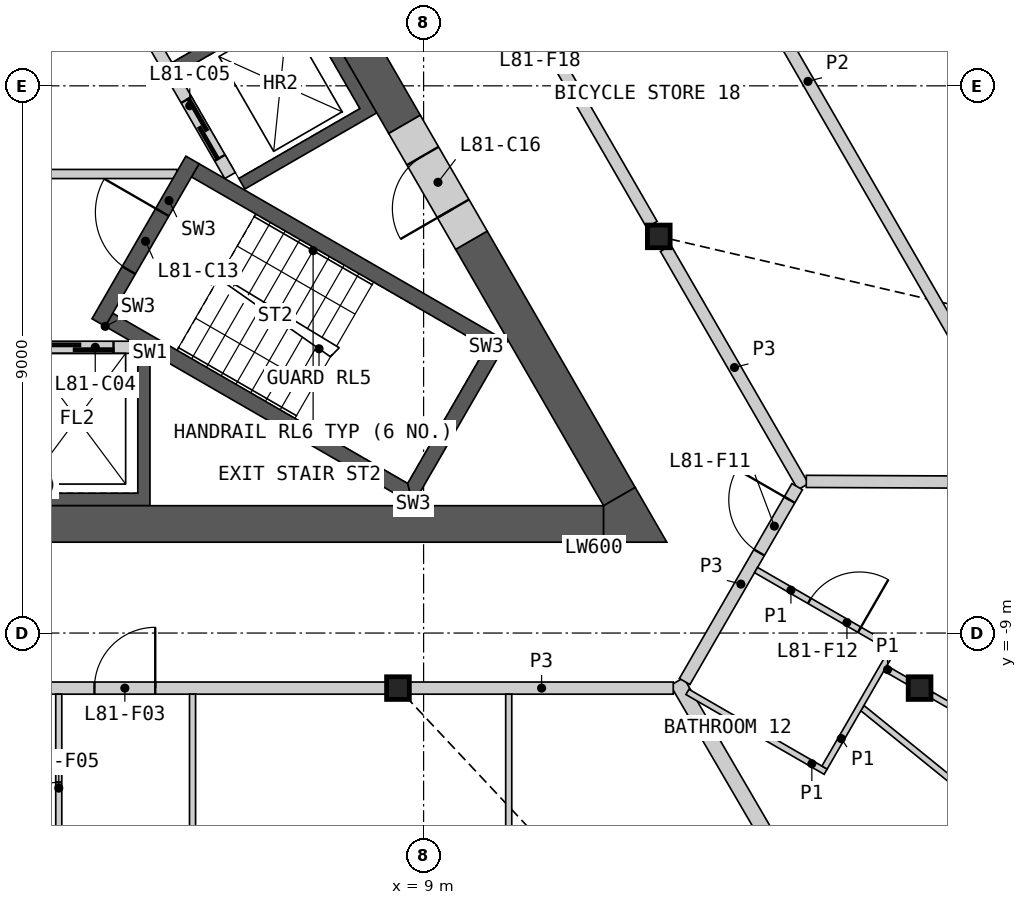
"""IFC4 building model, lengths in metres.
Left out: names, types, materials, properties, quantities, classifications, styles, units other than length and angle.
Written with IfcOpenShell. Run it as: python <this file> out.ifc"""

import sys

from ifc_helpers import new_model, si_unit, direction, frame, frame_2d, origin, origin_2d, place, context, subcontext, project, spatial, polyline, rectangle, i_section, outline, extrude, element, fill, save


model = new_model("IFC4")
c1 = context("Model", 3, precision=1e-05, world=origin(), true_north=direction((0.0, 1.0)))
c2 = subcontext(c1, "Body", "Model", "MODEL_VIEW")
j1 = project(units=[si_unit("LENGTHUNIT", "METRE"), si_unit("PLANEANGLEUNIT", "RADIAN")], contexts=[c1])
p1 = place(None, origin())
s1 = spatial("IfcSite", under=j1, at=p1, CompositionType="ELEMENT")
p2 = place(p1, origin())
s2 = spatial("IfcBuilding", under=s1, at=p2, CompositionType="ELEMENT")
p3 = place(p2, frame((0.0, 0.0, 364.4)))
s3 = spatial("IfcBuildingStorey", under=s2, at=p3, CompositionType="ELEMENT", Elevation=364.4)
for number, where, z_axis, x_axis in (
    (1, (8.578, -9.906, 0.0), (0.0, 0.0, 1.0), (1.0, 0.0, 0.0)),
    (2, (17.157, -9.906, 0.0), (0.0, 0.0, 1.0), (1.0, 0.0, 0.0)),
    (3, (12.868, -2.476, 0.0), (0.0, 0.0, 1.0), (1.0, 0.0, 0.0)),
):
    element("IfcColumn", number, at=place(p3, frame(where, z_axis=z_axis, x_axis=x_axis)), inside=s3, PredefinedType="COLUMN", context=c2, shape_type="SweptSolid", body=[
        extrude(i_section(OverallWidth=0.374, OverallDepth=0.372, WebThickness=0.016, FlangeThickness=0.026, at=origin_2d()), origin(), (0.0, 0.0, 1.0), 3.4),
    ])
p4 = place(p3, origin())
e4 = element("IfcWall", 4, at=p4, inside=s3, PredefinedType="SHEAR", context=c2, shape_type="SweptSolid", body=[
    extrude(outline(polyline([(4.5, -4.4), (4.5, -6.906), (-4.5, -6.906), (-4.5, -4.4), (-4.3, -4.4), (-4.3, -6.7), (-2.3, -6.7), (-2.3, -4.4), (-2.1, -4.4), (-2.1, -6.7), (-0.1, -6.7), (-0.1, -4.4), (0.1, -4.4), (0.1, -6.7), (2.1, -6.7), (2.1, -4.4), (2.3, -4.4), (2.3, -6.7), (4.3, -6.7), (4.3, -4.4), (4.5, -4.4)])), origin(), (0.0, 0.0, 1.0), 3.1),
])
p5 = place(p3, frame((-4.187, -4.3, 0.0), z_axis=(0.0, 0.0, 1.0), x_axis=(1.0, 0.0, 0.0)))
e5 = element("IfcWall", 5, at=p5, inside=s3, PredefinedType="SOLIDWALL", context=c2, shape_type="SweptSolid", body=[
    extrude(rectangle(XDim=8.373, YDim=0.2, at=frame_2d((4.187, 0.0))), origin(), (0.0, 0.0, 1.0), 3.1),
])
p6 = place(p5, frame((0.287, 0.0, 0.0)))
e6 = element("IfcOpeningElement", 6, at=p6, cuts=e5, PredefinedType="OPENING", context=c2, shape_type="SweptSolid", body=[
    extrude(rectangle(XDim=1.2, YDim=2.1, at=frame_2d((0.6, 1.05))), frame((0.0, 0.11, 0.0), z_axis=(0.0, -1.0, 0.0), x_axis=(1.0, 0.0, 0.0)), (0.0, 0.0, 1.0), 0.22),
])
p7 = place(p5, frame((2.387, 0.0, 0.0)))
e7 = element("IfcOpeningElement", 7, at=p7, cuts=e5, PredefinedType="OPENING", context=c2, shape_type="SweptSolid", body=[
    extrude(rectangle(XDim=1.4, YDim=2.1, at=frame_2d((0.7, 1.05))), frame((0.0, 0.11, 0.0), z_axis=(0.0, -1.0, 0.0), x_axis=(1.0, 0.0, 0.0)), (0.0, 0.0, 1.0), 0.22),
])
p8 = place(p5, frame((4.737, 0.0, 0.0)))
e8 = element("IfcOpeningElement", 8, at=p8, cuts=e5, PredefinedType="OPENING", context=c2, shape_type="SweptSolid", body=[
    extrude(rectangle(XDim=1.1, YDim=2.1, at=frame_2d((0.55, 1.05))), frame((0.0, 0.11, 0.0), z_axis=(0.0, -1.0, 0.0), x_axis=(1.0, 0.0, 0.0)), (0.0, 0.0, 1.0), 0.22),
])
p9 = place(p5, frame((6.887, 0.0, 0.0)))
e9 = element("IfcOpeningElement", 9, at=p9, cuts=e5, PredefinedType="OPENING", context=c2, shape_type="SweptSolid", body=[
    extrude(rectangle(XDim=1.2, YDim=2.1, at=frame_2d((0.6, 1.05))), frame((0.0, 0.11, 0.0), z_axis=(0.0, -1.0, 0.0), x_axis=(1.0, 0.0, 0.0)), (0.0, 0.0, 1.0), 0.22),
])
p10 = place(p3, origin())
e10 = element("IfcWall", 10, at=p10, inside=s3, PredefinedType="SHEAR", context=c2, shape_type="SweptSolid", body=[
    extrude(outline(polyline([(1.561, 6.097), (3.731, 7.35), (8.231, -0.444), (6.061, -1.697), (5.96, -1.524), (7.952, -0.374), (6.952, 1.358), (4.96, 0.208), (4.861, 0.381), (6.852, 1.531), (5.852, 3.263), (3.861, 2.113), (3.76, 2.287), (5.752, 3.437), (4.752, 5.169), (2.76, 4.019), (2.66, 4.192), (4.652, 5.342), (3.652, 7.074), (1.66, 5.924), (1.561, 6.097)])), origin(), (0.0, 0.0, 1.0), 3.1),
])
p11 = place(p3, frame((5.817, -1.476, 0.0), z_axis=(0.0, 0.0, 1.0), x_axis=(-0.500002616675, 0.866023893041, 0.0)))
e11 = element("IfcWall", 11, at=p11, inside=s3, PredefinedType="SOLIDWALL", context=c2, shape_type="SweptSolid", body=[
    extrude(rectangle(XDim=8.373, YDim=0.2, at=frame_2d((4.187, 0.0))), origin(), (0.0, 0.0, 1.0), 3.1),
])
p12 = place(p11, frame((0.337, 0.0, 0.0)))
e12 = element("IfcOpeningElement", 12, at=p12, cuts=e11, PredefinedType="OPENING", context=c2, shape_type="SweptSolid", body=[
    extrude(rectangle(XDim=1.1, YDim=2.1, at=frame_2d((0.55, 1.05))), frame((0.0, 0.11, 0.0), z_axis=(0.0, -1.0, 0.0), x_axis=(1.0, 0.0, 0.0)), (0.0, 0.0, 1.0), 0.22),
])
p13 = place(p11, frame((2.537, 0.0, 0.0)))
e13 = element("IfcOpeningElement", 13, at=p13, cuts=e11, PredefinedType="OPENING", context=c2, shape_type="SweptSolid", body=[
    extrude(rectangle(XDim=1.1, YDim=2.1, at=frame_2d((0.55, 1.05))), frame((0.0, 0.11, 0.0), z_axis=(0.0, -1.0, 0.0), x_axis=(1.0, 0.0, 0.0)), (0.0, 0.0, 1.0), 0.22),
])
p14 = place(p11, frame((4.737, 0.0, 0.0)))
e14 = element("IfcOpeningElement", 14, at=p14, cuts=e11, PredefinedType="OPENING", context=c2, shape_type="SweptSolid", body=[
    extrude(rectangle(XDim=1.1, YDim=2.1, at=frame_2d((0.55, 1.05))), frame((0.0, 0.11, 0.0), z_axis=(0.0, -1.0, 0.0), x_axis=(1.0, 0.0, 0.0)), (0.0, 0.0, 1.0), 0.22),
])
p15 = place(p11, frame((7.037, 0.0, 0.0)))
e15 = element("IfcOpeningElement", 15, at=p15, cuts=e11, PredefinedType="OPENING", context=c2, shape_type="SweptSolid", body=[
    extrude(rectangle(XDim=0.9, YDim=2.1, at=frame_2d((0.45, 1.05))), frame((0.0, 0.11, 0.0), z_axis=(0.0, -1.0, 0.0), x_axis=(1.0, 0.0, 0.0)), (0.0, 0.0, 1.0), 0.22),
])
p16 = place(p3, frame((-4.941, -1.45, 0.0), z_axis=(0.0, 0.0, 1.0), x_axis=(1.0, 0.0, 0.0)))
e16 = element("IfcWall", 16, at=p16, inside=s3, PredefinedType="PARTITIONING", context=c2, shape_type="SweptSolid", body=[
    extrude(rectangle(XDim=9.882, YDim=0.15, at=frame_2d((4.941, 0.0))), origin(), (0.0, 0.0, 1.0), 3.1),
])
p17 = place(p16, frame((4.391, 0.0, 0.0)))
e17 = element("IfcOpeningElement", 17, at=p17, cuts=e16, PredefinedType="OPENING", context=c2, shape_type="SweptSolid", body=[
    extrude(rectangle(XDim=1.1, YDim=2.1, at=frame_2d((0.55, 1.05))), frame((0.0, 0.085, 0.0), z_axis=(0.0, -1.0, 0.0), x_axis=(1.0, 0.0, 0.0)), (0.0, 0.0, 1.0), 0.17),
])
p18 = place(p3, origin())
e18 = element("IfcWall", 18, at=p18, inside=s3, PredefinedType="SHEAR", context=c2, shape_type="SweptSolid", body=[
    extrude(outline(polyline([(3.763, -3.956), (8.83, -6.881), (8.738, -6.539), (3.888, -3.739), (3.763, -3.956)])), origin(), (0.0, 0.0, 1.0), 3.1),
])
p19 = place(p3, origin())
e19 = element("IfcWall", 19, at=p19, inside=s3, PredefinedType="SHEAR", context=c2, shape_type="SweptSolid", body=[
    extrude(outline(polyline([(8.83, -6.881), (10.374, -4.206), (10.032, -4.298), (8.738, -6.539), (8.83, -6.881)])), origin(), (0.0, 0.0, 1.0), 3.1),
])
p20 = place(p3, origin())
e20 = element("IfcWall", 20, at=p20, inside=s3, PredefinedType="SHEAR", context=c2, shape_type="SweptSolid", body=[
    extrude(outline(polyline([(10.032, -4.298), (10.374, -4.206), (5.307, -1.281), (5.182, -1.498), (10.032, -4.298)])), origin(), (0.0, 0.0, 1.0), 3.1),
])
p21 = place(p3, frame((3.655, -3.893, 0.0), z_axis=(0.0, 0.0, 1.0), x_axis=(0.499982516597, 0.866035497597, 0.0)))
e21 = element("IfcWall", 21, at=p21, inside=s3, PredefinedType="SHEAR", context=c2, shape_type="SweptSolid", body=[
    extrude(rectangle(XDim=3.088, YDim=0.25, at=frame_2d((1.544, 0.0))), origin(), (0.0, 0.0, 1.0), 3.1),
])
p22 = place(p21, frame((0.994, 0.0, 0.0)))
e22 = element("IfcOpeningElement", 22, at=p22, cuts=e21, PredefinedType="OPENING", context=c2, shape_type="SweptSolid", body=[
    extrude(rectangle(XDim=1.1, YDim=2.1, at=frame_2d((0.55, 1.05))), frame((0.0, 0.135, 0.0), z_axis=(0.0, -1.0, 0.0), x_axis=(1.0, 0.0, 0.0)), (0.0, 0.0, 1.0), 0.27),
])
p23 = place(p3, frame((-11.961, -7.206, 0.0), z_axis=(0.0, 0.0, 1.0), x_axis=(1.0, 0.0, 0.0)))
e23 = element("IfcWall", 23, at=p23, inside=s3, PredefinedType="SHEAR", context=c2, shape_type="SweptSolid", body=[
    extrude(rectangle(XDim=23.921, YDim=0.6, at=frame_2d((11.961, 0.0))), origin(), (0.0, 0.0, 1.0), 3.1),
])
p24 = place(p3, frame((8.686, -0.634, 0.0), z_axis=(0.0, 0.0, 1.0), x_axis=(-0.50001836461, 0.866014800712, 0.0)))
e24 = element("IfcWall", 24, at=p24, inside=s3, PredefinedType="SHEAR", context=c2, shape_type="SweptSolid", body=[
    extrude(rectangle(XDim=10.451, YDim=0.6, at=frame_2d((5.225, 0.0))), origin(), (0.0, 0.0, 1.0), 3.1),
])
p25 = place(p3, frame((12.221, -6.756, 0.0), z_axis=(0.0, 0.0, 1.0), x_axis=(-0.50000604952, 0.866021911064, 0.0)))
e25 = element("IfcWall", 25, at=p25, inside=s3, PredefinedType="SHEAR", context=c2, shape_type="SweptSolid", body=[
    extrude(rectangle(XDim=4.869, YDim=0.6, at=frame_2d((2.434, 0.0))), origin(), (0.0, 0.0, 1.0), 3.1),
])
p26 = place(p3, origin())
e26 = element("IfcWall", 26, at=p26, inside=s3, PredefinedType="SHEAR", context=c2, shape_type="SweptSolid", body=[
    extrude(outline(polyline([(11.961, -7.506), (11.961, -6.906), (12.48, -6.606), (13.0, -7.506), (11.961, -7.506)])), origin(), (0.0, 0.0, 1.0), 3.1),
])
p27 = place(p3, frame((9.786, -2.539, 0.0), z_axis=(0.0, 0.0, 1.0), x_axis=(-0.499981787252, 0.866035918664, 0.0)))
e27 = element("IfcWall", 27, at=p27, inside=s3, PredefinedType="SHEAR", context=c2, shape_type="SweptSolid", body=[
    extrude(rectangle(XDim=2.2, YDim=0.6, at=frame_2d((1.1, 0.0))), origin(), (0.0, 0.0, 1.0), 3.1),
])
p28 = place(p27, frame((0.6, 0.0, 0.0)))
e28 = element("IfcOpeningElement", 28, at=p28, cuts=e27, PredefinedType="OPENING", context=c2, shape_type="SweptSolid", body=[
    extrude(rectangle(XDim=1.0, YDim=2.1, at=frame_2d((0.5, 1.05))), frame((0.0, 0.31, 0.0), z_axis=(0.0, -1.0, 0.0), x_axis=(1.0, 0.0, 0.0)), (0.0, 0.0, 1.0), 0.62),
])
p29 = place(p3, frame((13.168, -9.798, 0.0), z_axis=(0.0, 0.0, 1.0), x_axis=(0.503632750219, -0.863917850786, 0.0)))
e29 = element("IfcWall", 29, at=p29, inside=s3, PredefinedType="PARTITIONING", context=c2, shape_type="SweptSolid", body=[
    extrude(rectangle(XDim=14.972, YDim=0.25, at=frame_2d((7.486, 0.0))), origin(), (0.0, 0.0, 1.0), 2.33),
])
p30 = place(p3, frame((0.197, -9.906, 0.0), z_axis=(0.0, 0.0, 1.0), x_axis=(1.0, 0.0, 0.0)))
e30 = element("IfcWall", 30, at=p30, inside=s3, PredefinedType="PARTITIONING", context=c2, shape_type="SweptSolid", body=[
    extrude(rectangle(XDim=8.185, YDim=0.2, at=frame_2d((4.092, 0.0))), origin(), (0.0, 0.0, 1.0), 3.1),
])
p31 = place(p30, frame((3.39, 0.0, 0.0)))
e31 = element("IfcOpeningElement", 31, at=p31, cuts=e30, PredefinedType="OPENING", context=c2, shape_type="SweptSolid", body=[
    extrude(rectangle(XDim=1.0, YDim=2.1, at=frame_2d((0.5, 1.05))), frame((0.0, 0.11, 0.0), z_axis=(0.0, -1.0, 0.0), x_axis=(1.0, 0.0, 0.0)), (0.0, 0.0, 1.0), 0.22),
])
p32 = place(p3, frame((8.692, 4.756, 0.0), z_axis=(0.0, 0.0, 1.0), x_axis=(0.500001682468, -0.866024432409, 0.0)))
e32 = element("IfcWall", 32, at=p32, inside=s3, PredefinedType="PARTITIONING", context=c2, shape_type="SweptSolid", body=[
    extrude(rectangle(XDim=8.124, YDim=0.2, at=frame_2d((4.062, 0.0))), origin(), (0.0, 0.0, 1.0), 3.1),
])
p33 = place(p32, frame((3.587, 0.0, 0.0)))
e33 = element("IfcOpeningElement", 33, at=p33, cuts=e32, PredefinedType="OPENING", context=c2, shape_type="SweptSolid", body=[
    extrude(rectangle(XDim=0.95, YDim=2.1, at=frame_2d((0.475, 1.05))), frame((0.0, 0.11, 0.0), z_axis=(0.0, -1.0, 0.0), x_axis=(1.0, 0.0, 0.0)), (0.0, 0.0, 1.0), 0.22),
])
p34 = place(p3, frame((8.775, -9.906, 0.0), z_axis=(0.0, 0.0, 1.0), x_axis=(1.0, 0.0, 0.0)))
e34 = element("IfcWall", 34, at=p34, inside=s3, PredefinedType="PARTITIONING", context=c2, shape_type="SweptSolid", body=[
    extrude(rectangle(XDim=4.331, YDim=0.2, at=frame_2d((2.165, 0.0))), origin(), (0.0, 0.0, 1.0), 3.1),
])
p35 = place(p3, frame((12.981, -2.673, 0.0), z_axis=(0.0, 0.0, 1.0), x_axis=(0.499974648164, -0.866040040179, 0.0)))
e35 = element("IfcWall", 35, at=p35, inside=s3, PredefinedType="PARTITIONING", context=c2, shape_type="SweptSolid", body=[
    extrude(rectangle(XDim=4.525, YDim=0.2, at=frame_2d((2.263, 0.0))), origin(), (0.0, 0.0, 1.0), 3.1),
])
p36 = place(p3, frame((13.293, -9.797, 0.0), z_axis=(0.0, 0.0, 1.0), x_axis=(0.499977520935, 0.86603838169, 0.0)))
e36 = element("IfcWall", 36, at=p36, inside=s3, PredefinedType="PARTITIONING", context=c2, shape_type="SweptSolid", body=[
    extrude(rectangle(XDim=3.701, YDim=0.2, at=frame_2d((1.851, 0.0))), origin(), (0.0, 0.0, 1.0), 3.1),
])
p37 = place(p36, frame((2.451, 0.0, 0.0)))
e37 = element("IfcOpeningElement", 37, at=p37, cuts=e36, PredefinedType="OPENING", context=c2, shape_type="SweptSolid", body=[
    extrude(rectangle(XDim=1.0, YDim=2.1, at=frame_2d((0.5, 1.05))), frame((0.0, 0.11, 0.0), z_axis=(0.0, -1.0, 0.0), x_axis=(1.0, 0.0, 0.0)), (0.0, 0.0, 1.0), 0.22),
])
p38 = place(p3, frame((11.573, 6.566, 0.0), z_axis=(0.0, 0.0, 1.0), x_axis=(0.499993542657, -0.866029131901, 0.0)))
e38 = element("IfcWall", 38, at=p38, inside=s3, PredefinedType="PARTITIONING", context=c2, shape_type="SweptSolid", body=[
    extrude(rectangle(XDim=14.994, YDim=0.2, at=frame_2d((7.497, 0.0))), origin(), (0.0, 0.0, 1.0), 2.33),
])
p39 = place(p38, frame((5.166, 0.0, 0.0)))
e39 = element("IfcOpeningElement", 39, at=p39, cuts=e38, PredefinedType="OPENING", context=c2, shape_type="SweptSolid", body=[
    extrude(rectangle(XDim=0.95, YDim=2.1, at=frame_2d((0.475, 1.05))), frame((0.0, 0.11, 0.0), z_axis=(0.0, -1.0, 0.0), x_axis=(1.0, 0.0, 0.0)), (0.0, 0.0, 1.0), 0.22),
])
p40 = place(p3, frame((15.294, -6.506, 0.0), z_axis=(0.0, 0.0, 1.0), x_axis=(0.99999116141, -0.004204414611, 0.0)))
e40 = element("IfcWall", 40, at=p40, inside=s3, PredefinedType="PARTITIONING", context=c2, shape_type="SweptSolid", body=[
    extrude(rectangle(XDim=14.807, YDim=0.2, at=frame_2d((7.404, 0.0))), origin(), (0.0, 0.0, 1.0), 2.33),
])
p41 = place(p3, frame((16.216, -10.234, 0.0), z_axis=(0.0, 0.0, 1.0), x_axis=(0.777145059662, -0.629321504672, 0.0)))
e41 = element("IfcWall", 41, at=p41, inside=s3, PredefinedType="PARTITIONING", context=c2, shape_type="SweptSolid", body=[
    extrude(rectangle(XDim=12.59, YDim=0.1, at=frame_2d((6.295, 0.0))), origin(), (0.0, 0.0, 1.0), 2.33),
])
p42 = place(p41, frame((7.074, 0.0, 0.0)))
e42 = element("IfcOpeningElement", 42, at=p42, cuts=e41, PredefinedType="OPENING", context=c2, shape_type="SweptSolid", body=[
    extrude(rectangle(XDim=0.95, YDim=2.1, at=frame_2d((0.475, 1.05))), frame((0.0, 0.06, 0.0), z_axis=(0.0, -1.0, 0.0), x_axis=(1.0, 0.0, 0.0)), (0.0, 0.0, 1.0), 0.12),
])
p43 = place(p3, frame((10.4, -21.828, 0.0), z_axis=(0.0, 0.0, 1.0), x_axis=(0.0, 1.0, 0.0)))
e43 = element("IfcWall", 43, at=p43, inside=s3, PredefinedType="PARTITIONING", context=c2, shape_type="SweptSolid", body=[
    extrude(rectangle(XDim=11.822, YDim=0.1, at=frame_2d((5.911, 0.0))), origin(), (0.0, 0.0, 1.0), 2.33),
])
p44 = place(p43, frame((1.156, 0.0, 0.0)))
e44 = element("IfcOpeningElement", 44, at=p44, cuts=e43, PredefinedType="OPENING", context=c2, shape_type="SweptSolid", body=[
    extrude(rectangle(XDim=0.95, YDim=2.1, at=frame_2d((0.475, 1.05))), frame((0.0, 0.06, 0.0), z_axis=(0.0, -1.0, 0.0), x_axis=(1.0, 0.0, 0.0)), (0.0, 0.0, 1.0), 0.12),
])
p45 = place(p3, frame((17.354, -10.019, 0.0), z_axis=(0.0, 0.0, 1.0), x_axis=(0.866019680922, -0.500009912158, 0.0)))
e45 = element("IfcWall", 45, at=p45, inside=s3, PredefinedType="PARTITIONING", context=c2, shape_type="SweptSolid", body=[
    extrude(rectangle(XDim=10.881, YDim=0.1, at=frame_2d((5.44, 0.0))), origin(), (0.0, 0.0, 1.0), 2.33),
])
p46 = place(p45, frame((1.655, 0.0, 0.0)))
e46 = element("IfcOpeningElement", 46, at=p46, cuts=e45, PredefinedType="OPENING", context=c2, shape_type="SweptSolid", body=[
    extrude(rectangle(XDim=0.95, YDim=2.1, at=frame_2d((0.475, 1.05))), frame((0.0, 0.06, 0.0), z_axis=(0.0, -1.0, 0.0), x_axis=(1.0, 0.0, 0.0)), (0.0, 0.0, 1.0), 0.12),
])
p47 = place(p3, frame((5.2, -17.146, 0.0), z_axis=(0.0, 0.0, 1.0), x_axis=(0.0, 1.0, 0.0)))
e47 = element("IfcWall", 47, at=p47, inside=s3, PredefinedType="PARTITIONING", context=c2, shape_type="SweptSolid", body=[
    extrude(rectangle(XDim=7.14, YDim=0.1, at=frame_2d((3.57, 0.0))), origin(), (0.0, 0.0, 1.0), 2.33),
])
p48 = place(p47, frame((1.266, 0.0, 0.0)))
e48 = element("IfcOpeningElement", 48, at=p48, cuts=e47, PredefinedType="OPENING", context=c2, shape_type="SweptSolid", body=[
    extrude(rectangle(XDim=0.95, YDim=2.1, at=frame_2d((0.475, 1.05))), frame((0.0, 0.06, 0.0), z_axis=(0.0, -1.0, 0.0), x_axis=(1.0, 0.0, 0.0)), (0.0, 0.0, 1.0), 0.12),
])
p49 = place(p3, frame((3.0, -15.956, 0.0), z_axis=(0.0, 0.0, 1.0), x_axis=(0.0, 1.0, 0.0)))
e49 = element("IfcWall", 49, at=p49, inside=s3, PredefinedType="PARTITIONING", context=c2, shape_type="SweptSolid", body=[
    extrude(rectangle(XDim=5.95, YDim=0.1, at=frame_2d((2.975, 0.0))), origin(), (0.0, 0.0, 1.0), 2.33),
])
p50 = place(p49, frame((3.55, 0.0, 0.0)))
e50 = element("IfcOpeningElement", 50, at=p50, cuts=e49, PredefinedType="OPENING", context=c2, shape_type="SweptSolid", body=[
    extrude(rectangle(XDim=0.95, YDim=2.1, at=frame_2d((0.475, 1.05))), frame((0.0, 0.06, 0.0), z_axis=(0.0, -1.0, 0.0), x_axis=(1.0, 0.0, 0.0)), (0.0, 0.0, 1.0), 0.12),
])
p51 = place(p3, frame((14.467, -7.964, 0.0), z_axis=(0.0, 0.0, 1.0), x_axis=(0.86601223543, -0.500022807565, 0.0)))
e51 = element("IfcWall", 51, at=p51, inside=s3, PredefinedType="PARTITIONING", context=c2, shape_type="SweptSolid", body=[
    extrude(rectangle(XDim=2.65, YDim=0.1, at=frame_2d((1.325, 0.0))), origin(), (0.0, 0.0, 1.0), 2.33),
])
p52 = place(p51, frame((1.014, 0.0, 0.0)))
e52 = element("IfcOpeningElement", 52, at=p52, cuts=e51, PredefinedType="OPENING", context=c2, shape_type="SweptSolid", body=[
    extrude(rectangle(XDim=0.95, YDim=2.1, at=frame_2d((0.475, 1.05))), frame((0.0, 0.06, 0.0), z_axis=(0.0, -1.0, 0.0), x_axis=(1.0, 0.0, 0.0)), (0.0, 0.0, 1.0), 0.12),
])
p53 = place(p3, frame((13.339, -9.968, 0.0), z_axis=(0.0, 0.0, 1.0), x_axis=(0.866013657776, -0.500020344131, 0.0)))
e53 = element("IfcWall", 53, at=p53, inside=s3, PredefinedType="PARTITIONING", context=c2, shape_type="SweptSolid", body=[
    extrude(rectangle(XDim=2.625, YDim=0.1, at=frame_2d((1.312, 0.0))), origin(), (0.0, 0.0, 1.0), 2.33),
])
p54 = place(p3, frame((15.594, -11.212, 0.0), z_axis=(0.0, 0.0, 1.0), x_axis=(0.499981787252, 0.866035918664, 0.0)))
e54 = element("IfcWall", 54, at=p54, inside=s3, PredefinedType="PARTITIONING", context=c2, shape_type="SweptSolid", body=[
    extrude(rectangle(XDim=2.2, YDim=0.1, at=frame_2d((1.1, 0.0))), origin(), (0.0, 0.0, 1.0), 2.33),
])
p55 = place(p3, frame((16.594, -9.581, 0.0), z_axis=(0.0, 0.0, 1.0), x_axis=(0.866137484628, -0.499805820016, 0.0)))
e55 = element("IfcWall", 55, at=p55, inside=s3, PredefinedType="PARTITIONING", context=c2, shape_type="SweptSolid", body=[
    extrude(rectangle(XDim=0.423, YDim=0.1, at=frame_2d((0.211, 0.0))), origin(), (0.0, 0.0, 1.0), 2.33),
])
p56 = place(p9, origin())
e56 = element("IfcDoor", 56, at=p56, inside=s3, OperationType="SLIDING_TO_LEFT", PredefinedType="DOOR", context=c2, shape_type="SweptSolid", body=[
    extrude(rectangle(XDim=1.2, YDim=2.1, at=frame_2d((0.6, 1.05))), frame((0.0, 0.025, 0.0), z_axis=(0.0, -1.0, 0.0), x_axis=(1.0, 0.0, 0.0)), (0.0, 0.0, 1.0), 0.05),
])
fill(e9, e56)
p57 = place(p12, origin())
e57 = element("IfcDoor", 57, at=p57, inside=s3, OperationType="SLIDING_TO_LEFT", PredefinedType="DOOR", context=c2, shape_type="SweptSolid", body=[
    extrude(rectangle(XDim=1.1, YDim=2.1, at=frame_2d((0.55, 1.05))), frame((0.0, 0.025, 0.0), z_axis=(0.0, -1.0, 0.0), x_axis=(1.0, 0.0, 0.0)), (0.0, 0.0, 1.0), 0.05),
])
fill(e12, e57)
p58 = place(p22, origin())
e58 = element("IfcDoor", 58, at=p58, inside=s3, OperationType="SINGLE_SWING_RIGHT", PredefinedType="DOOR", context=c2, shape_type="SweptSolid", body=[
    extrude(rectangle(XDim=1.1, YDim=2.1, at=frame_2d((0.55, 1.05))), frame((0.0, 0.025, 0.0), z_axis=(0.0, -1.0, 0.0), x_axis=(1.0, 0.0, 0.0)), (0.0, 0.0, 1.0), 0.05),
])
fill(e22, e58)
p59 = place(p28, origin())
e59 = element("IfcDoor", 59, at=p59, inside=s3, OperationType="SINGLE_SWING_LEFT", PredefinedType="DOOR", context=c2, shape_type="SweptSolid", body=[
    extrude(rectangle(XDim=1.0, YDim=2.1, at=frame_2d((0.5, 1.05))), frame((0.0, 0.055, 0.0), z_axis=(0.0, -1.0, 0.0), x_axis=(1.0, 0.0, 0.0)), (0.0, 0.0, 1.0), 0.05),
])
fill(e28, e59)
p60 = place(p31, origin())
e60 = element("IfcDoor", 60, at=p60, inside=s3, OperationType="SINGLE_SWING_RIGHT", PredefinedType="DOOR", context=c2, shape_type="SweptSolid", body=[
    extrude(rectangle(XDim=1.0, YDim=2.1, at=frame_2d((0.5, 1.05))), frame((0.0, 0.025, 0.0), z_axis=(0.0, -1.0, 0.0), x_axis=(1.0, 0.0, 0.0)), (0.0, 0.0, 1.0), 0.05),
])
fill(e31, e60)
p61 = place(p50, origin())
e61 = element("IfcDoor", 61, at=p61, inside=s3, OperationType="SINGLE_SWING_LEFT", PredefinedType="DOOR", context=c2, shape_type="SweptSolid", body=[
    extrude(rectangle(XDim=0.95, YDim=2.1, at=frame_2d((0.475, 1.05))), frame((0.0, 0.025, 0.0), z_axis=(0.0, -1.0, 0.0), x_axis=(1.0, 0.0, 0.0)), (0.0, 0.0, 1.0), 0.05),
])
fill(e50, e61)
p62 = place(p37, origin())
e62 = element("IfcDoor", 62, at=p62, inside=s3, OperationType="SINGLE_SWING_RIGHT", PredefinedType="DOOR", context=c2, shape_type="SweptSolid", body=[
    extrude(rectangle(XDim=1.0, YDim=2.1, at=frame_2d((0.5, 1.05))), frame((0.0, 0.025, 0.0), z_axis=(0.0, -1.0, 0.0), x_axis=(1.0, 0.0, 0.0)), (0.0, 0.0, 1.0), 0.05),
])
fill(e37, e62)
p63 = place(p52, origin())
e63 = element("IfcDoor", 63, at=p63, inside=s3, OperationType="SINGLE_SWING_RIGHT", PredefinedType="DOOR", context=c2, shape_type="SweptSolid", body=[
    extrude(rectangle(XDim=0.95, YDim=2.1, at=frame_2d((0.475, 1.05))), frame((0.0, 0.025, 0.0), z_axis=(0.0, -1.0, 0.0), x_axis=(1.0, 0.0, 0.0)), (0.0, 0.0, 1.0), 0.05),
])
fill(e52, e63)
save(model, sys.argv[1])
